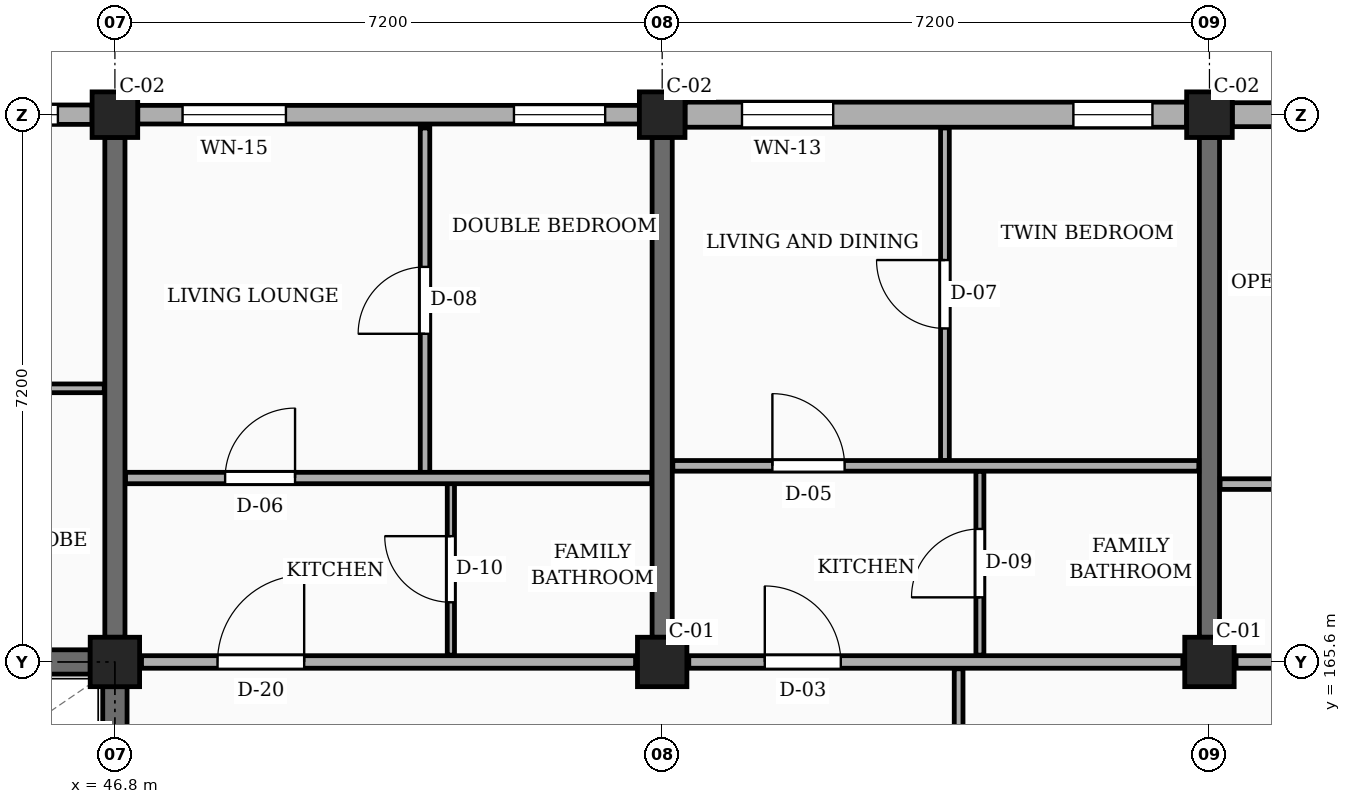
"""IFC4 building model, lengths in metres.
Left out: names, types, materials, properties, quantities, classifications, styles, units other than length and angle.
Written with IfcOpenShell. Run it as: python <this file> out.ifc"""

import sys

from ifc_helpers import new_model, si_unit, direction, frame, frame_2d, origin, origin_2d, place, context, subcontext, project, spatial, rectangle, extrude, element, fill, save


model = new_model("IFC4")
c1 = context("Model", 3, precision=1e-05, world=origin(), true_north=direction((0.0, 1.0)))
c2 = subcontext(c1, "Body", "Model", "MODEL_VIEW")
j1 = project(units=[si_unit("LENGTHUNIT", "METRE"), si_unit("PLANEANGLEUNIT", "RADIAN")], contexts=[c1])
p1 = place(None, origin())
s1 = spatial("IfcSite", under=j1, at=p1, CompositionType="ELEMENT")
p2 = place(p1, origin())
s2 = spatial("IfcBuilding", under=s1, at=p2, CompositionType="ELEMENT")
p3 = place(p2, frame((0.0, 0.0, 4.5)))
s3 = spatial("IfcBuildingStorey", under=s2, at=p3, CompositionType="ELEMENT", Elevation=4.5)
p4 = place(p3, frame((46.8, 165.6, 0.0), z_axis=(0.0, 0.0, 1.0), x_axis=(1.0, 0.0, 0.0)))
e1 = element("IfcColumn", 1, at=p4, inside=s3, PredefinedType="COLUMN", context=c2, shape_type="SweptSolid", body=[
    extrude(rectangle(XDim=0.65, YDim=0.65, at=origin_2d()), origin(), (0.0, 0.0, 1.0), 3.15),
])
p5 = place(p3, frame((46.8, 172.8, 0.0), z_axis=(0.0, 0.0, 1.0), x_axis=(1.0, 0.0, 0.0)))
e2 = element("IfcColumn", 2, at=p5, inside=s3, PredefinedType="COLUMN", context=c2, shape_type="SweptSolid", body=[
    extrude(rectangle(XDim=0.6, YDim=0.6, at=origin_2d()), origin(), (0.0, 0.0, 1.0), 3.15),
])
p6 = place(p3, frame((54.0, 165.6, 0.0), z_axis=(0.0, 0.0, 1.0), x_axis=(1.0, 0.0, 0.0)))
e3 = element("IfcColumn", 3, at=p6, inside=s3, PredefinedType="COLUMN", context=c2, shape_type="SweptSolid", body=[
    extrude(rectangle(XDim=0.65, YDim=0.65, at=origin_2d()), origin(), (0.0, 0.0, 1.0), 3.15),
])
p7 = place(p3, frame((54.0, 172.8, 0.0), z_axis=(0.0, 0.0, 1.0), x_axis=(1.0, 0.0, 0.0)))
e4 = element("IfcColumn", 4, at=p7, inside=s3, PredefinedType="COLUMN", context=c2, shape_type="SweptSolid", body=[
    extrude(rectangle(XDim=0.6, YDim=0.6, at=origin_2d()), origin(), (0.0, 0.0, 1.0), 3.15),
])
p8 = place(p3, frame((61.2, 165.6, 0.0), z_axis=(0.0, 0.0, 1.0), x_axis=(1.0, 0.0, 0.0)))
e5 = element("IfcColumn", 5, at=p8, inside=s3, PredefinedType="COLUMN", context=c2, shape_type="SweptSolid", body=[
    extrude(rectangle(XDim=0.65, YDim=0.65, at=origin_2d()), origin(), (0.0, 0.0, 1.0), 3.15),
])
p9 = place(p3, frame((61.2, 172.8, 0.0), z_axis=(0.0, 0.0, 1.0), x_axis=(1.0, 0.0, 0.0)))
e6 = element("IfcColumn", 6, at=p9, inside=s3, PredefinedType="COLUMN", context=c2, shape_type="SweptSolid", body=[
    extrude(rectangle(XDim=0.6, YDim=0.6, at=origin_2d()), origin(), (0.0, 0.0, 1.0), 3.15),
])
for number, where, z_axis, x_axis in (
    (7, (46.8, 165.925, 0.0), (0.0, 0.0, 1.0), (0.0, 1.0, 0.0)),
    (8, (54.0, 165.925, 0.0), (0.0, 0.0, 1.0), (0.0, 1.0, 0.0)),
    (9, (61.2, 165.925, 0.0), (0.0, 0.0, 1.0), (0.0, 1.0, 0.0)),
):
    element("IfcWall", number, at=place(p3, frame(where, z_axis=z_axis, x_axis=x_axis)), inside=s3, PredefinedType="SOLIDWALL", context=c2, shape_type="SweptSolid", body=[
        extrude(rectangle(XDim=6.575, YDim=0.265, at=frame_2d((3.288, 0.0))), origin(), (0.0, 0.0, 1.0), 2.185),
    ])
p10 = place(p3, frame((68.1, 172.8, 0.0), z_axis=(0.0, 0.0, 1.0), x_axis=(-1.0, 0.0, 0.0)))
e10 = element("IfcWall", 10, at=p10, inside=s3, PredefinedType="SOLIDWALL", context=c2, shape_type="SweptSolid", body=[
    extrude(rectangle(XDim=6.6, YDim=0.315, at=frame_2d((3.3, 0.0))), origin(), (0.0, 0.0, 1.0), 2.455),
])
p11 = place(p10, frame((0.45, 0.0, 0.78)))
e11 = element("IfcOpeningElement", 11, at=p11, cuts=e10, PredefinedType="OPENING", context=c2, shape_type="SweptSolid", body=[
    extrude(rectangle(XDim=0.88, YDim=1.26, at=frame_2d((0.44, 0.63))), frame((0.0, 0.167, 0.0), z_axis=(0.0, -1.0, 0.0), x_axis=(1.0, 0.0, 0.0)), (0.0, 0.0, 1.0), 0.335),
])
p12 = place(p10, frame((4.65, 0.0, 0.78)))
e12 = element("IfcOpeningElement", 12, at=p12, cuts=e10, PredefinedType="OPENING", context=c2, shape_type="SweptSolid", body=[
    extrude(rectangle(XDim=1.04, YDim=1.26, at=frame_2d((0.52, 0.63))), frame((0.0, 0.167, 0.0), z_axis=(0.0, -1.0, 0.0), x_axis=(1.0, 0.0, 0.0)), (0.0, 0.0, 1.0), 0.335),
])
p13 = place(p3, frame((60.9, 172.8, 0.0), z_axis=(0.0, 0.0, 1.0), x_axis=(-1.0, 0.0, 0.0)))
e13 = element("IfcWall", 13, at=p13, inside=s3, PredefinedType="SOLIDWALL", context=c2, shape_type="SweptSolid", body=[
    extrude(rectangle(XDim=6.6, YDim=0.33, at=frame_2d((3.3, 0.0))), origin(), (0.0, 0.0, 1.0), 2.455),
])
p14 = place(p13, frame((0.45, 0.0, 0.78)))
e14 = element("IfcOpeningElement", 14, at=p14, cuts=e13, PredefinedType="OPENING", context=c2, shape_type="SweptSolid", body=[
    extrude(rectangle(XDim=1.04, YDim=1.26, at=frame_2d((0.52, 0.63))), frame((0.0, 0.175, 0.0), z_axis=(0.0, -1.0, 0.0), x_axis=(1.0, 0.0, 0.0)), (0.0, 0.0, 1.0), 0.35),
])
p15 = place(p13, frame((4.65, 0.0, 0.78)))
e15 = element("IfcOpeningElement", 15, at=p15, cuts=e13, PredefinedType="OPENING", context=c2, shape_type="SweptSolid", body=[
    extrude(rectangle(XDim=1.2, YDim=1.26, at=frame_2d((0.6, 0.63))), frame((0.0, 0.175, 0.0), z_axis=(0.0, -1.0, 0.0), x_axis=(1.0, 0.0, 0.0)), (0.0, 0.0, 1.0), 0.35),
])
p16 = place(p3, frame((53.7, 172.8, 0.0), z_axis=(0.0, 0.0, 1.0), x_axis=(-1.0, 0.0, 0.0)))
e16 = element("IfcWall", 16, at=p16, inside=s3, PredefinedType="SOLIDWALL", context=c2, shape_type="SweptSolid", body=[
    extrude(rectangle(XDim=6.6, YDim=0.245, at=frame_2d((3.3, 0.0))), origin(), (0.0, 0.0, 1.0), 2.455),
])
p17 = place(p16, frame((0.45, 0.0, 0.78)))
e17 = element("IfcOpeningElement", 17, at=p17, cuts=e16, PredefinedType="OPENING", context=c2, shape_type="SweptSolid", body=[
    extrude(rectangle(XDim=1.2, YDim=1.26, at=frame_2d((0.6, 0.63))), frame((0.0, 0.133, 0.0), z_axis=(0.0, -1.0, 0.0), x_axis=(1.0, 0.0, 0.0)), (0.0, 0.0, 1.0), 0.265),
])
p18 = place(p16, frame((4.65, 0.0, 0.78)))
e18 = element("IfcOpeningElement", 18, at=p18, cuts=e16, PredefinedType="OPENING", context=c2, shape_type="SweptSolid", body=[
    extrude(rectangle(XDim=1.36, YDim=1.26, at=frame_2d((0.68, 0.63))), frame((0.0, 0.133, 0.0), z_axis=(0.0, -1.0, 0.0), x_axis=(1.0, 0.0, 0.0)), (0.0, 0.0, 1.0), 0.265),
])
p19 = place(p3, frame((46.5, 172.8, 0.0), z_axis=(0.0, 0.0, 1.0), x_axis=(-1.0, 0.0, 0.0)))
e19 = element("IfcWall", 19, at=p19, inside=s3, PredefinedType="SOLIDWALL", context=c2, shape_type="SweptSolid", body=[
    extrude(rectangle(XDim=6.6, YDim=0.255, at=frame_2d((3.3, 0.0))), origin(), (0.0, 0.0, 1.0), 2.455),
])
p20 = place(p19, frame((0.45, 0.0, 0.78)))
e20 = element("IfcOpeningElement", 20, at=p20, cuts=e19, PredefinedType="OPENING", context=c2, shape_type="SweptSolid", body=[
    extrude(rectangle(XDim=1.36, YDim=1.26, at=frame_2d((0.68, 0.63))), frame((0.0, 0.137, 0.0), z_axis=(0.0, -1.0, 0.0), x_axis=(1.0, 0.0, 0.0)), (0.0, 0.0, 1.0), 0.275),
])
p21 = place(p19, frame((4.65, 0.0, 0.78)))
e21 = element("IfcOpeningElement", 21, at=p21, cuts=e19, PredefinedType="OPENING", context=c2, shape_type="SweptSolid", body=[
    extrude(rectangle(XDim=0.9, YDim=1.36, at=frame_2d((0.45, 0.68))), frame((0.0, 0.137, 0.0), z_axis=(0.0, -1.0, 0.0), x_axis=(1.0, 0.0, 0.0)), (0.0, 0.0, 1.0), 0.275),
])
p22 = place(p3, frame((39.925, 165.6, 0.0), z_axis=(0.0, 0.0, 1.0), x_axis=(1.0, 0.0, 0.0)))
e22 = element("IfcWall", 22, at=p22, inside=s3, PredefinedType="SHEAR", context=c2, shape_type="SweptSolid", body=[
    extrude(rectangle(XDim=6.55, YDim=0.32, at=frame_2d((3.275, 0.0))), origin(), (0.0, 0.0, 1.0), 2.885),
])
p23 = place(p3, frame((46.8, 158.725, 0.0), z_axis=(0.0, 0.0, 1.0), x_axis=(0.0, 1.0, 0.0)))
e23 = element("IfcWall", 23, at=p23, inside=s3, PredefinedType="SHEAR", context=c2, shape_type="SweptSolid", body=[
    extrude(rectangle(XDim=6.55, YDim=0.32, at=frame_2d((3.275, 0.0))), origin(), (0.0, 0.0, 1.0), 2.885),
])
p24 = place(p3, frame((47.15, 165.6, 0.0), z_axis=(0.0, 0.0, 1.0), x_axis=(1.0, 0.0, 0.0)))
e24 = element("IfcWall", 24, at=p24, inside=s3, PredefinedType="PARTITIONING", context=c2, shape_type="SweptSolid", body=[
    extrude(rectangle(XDim=6.5, YDim=0.165, at=frame_2d((3.25, 0.0))), origin(), (0.0, 0.0, 1.0), 2.185),
])
p25 = place(p24, frame((1.0, 0.0, 0.0)))
e25 = element("IfcOpeningElement", 25, at=p25, cuts=e24, PredefinedType="OPENING", context=c2, shape_type="SweptSolid", body=[
    extrude(rectangle(XDim=1.14, YDim=2.18, at=frame_2d((0.57, 1.09))), frame((0.0, 0.093, 0.0), z_axis=(0.0, -1.0, 0.0), x_axis=(1.0, 0.0, 0.0)), (0.0, 0.0, 1.0), 0.185),
])
p26 = place(p3, frame((54.35, 165.6, 0.0), z_axis=(0.0, 0.0, 1.0), x_axis=(1.0, 0.0, 0.0)))
e26 = element("IfcWall", 26, at=p26, inside=s3, PredefinedType="PARTITIONING", context=c2, shape_type="SweptSolid", body=[
    extrude(rectangle(XDim=6.5, YDim=0.165, at=frame_2d((3.25, 0.0))), origin(), (0.0, 0.0, 1.0), 2.185),
])
p27 = place(p26, frame((1.0, 0.0, 0.0)))
e27 = element("IfcOpeningElement", 27, at=p27, cuts=e26, PredefinedType="OPENING", context=c2, shape_type="SweptSolid", body=[
    extrude(rectangle(XDim=1.0, YDim=2.15, at=frame_2d((0.5, 1.075))), frame((0.0, 0.093, 0.0), z_axis=(0.0, -1.0, 0.0), x_axis=(1.0, 0.0, 0.0)), (0.0, 0.0, 1.0), 0.185),
])
p28 = place(p3, frame((61.55, 165.6, 0.0), z_axis=(0.0, 0.0, 1.0), x_axis=(1.0, 0.0, 0.0)))
e28 = element("IfcWall", 28, at=p28, inside=s3, PredefinedType="PARTITIONING", context=c2, shape_type="SweptSolid", body=[
    extrude(rectangle(XDim=6.5, YDim=0.165, at=frame_2d((3.25, 0.0))), origin(), (0.0, 0.0, 1.0), 2.185),
])
p29 = place(p28, frame((1.0, 0.0, 0.0)))
e29 = element("IfcOpeningElement", 29, at=p29, cuts=e28, PredefinedType="OPENING", context=c2, shape_type="SweptSolid", body=[
    extrude(rectangle(XDim=0.94, YDim=2.12, at=frame_2d((0.47, 1.06))), frame((0.0, 0.093, 0.0), z_axis=(0.0, -1.0, 0.0), x_axis=(1.0, 0.0, 0.0)), (0.0, 0.0, 1.0), 0.185),
])
p30 = place(p3, frame((39.74, 169.2, 0.0), z_axis=(0.0, 0.0, 1.0), x_axis=(1.0, 0.0, 0.0)))
e30 = element("IfcWall", 30, at=p30, inside=s3, PredefinedType="PARTITIONING", context=c2, shape_type="SweptSolid", body=[
    extrude(rectangle(XDim=6.92, YDim=0.115, at=frame_2d((3.46, 0.0))), origin(), (0.0, 0.0, 1.0), 2.32),
])
p31 = place(p30, frame((1.05, 0.0, 0.0)))
e31 = element("IfcOpeningElement", 31, at=p31, cuts=e30, PredefinedType="OPENING", context=c2, shape_type="SweptSolid", body=[
    extrude(rectangle(XDim=0.87, YDim=2.05, at=frame_2d((0.435, 1.025))), frame((0.0, 0.067, 0.0), z_axis=(0.0, -1.0, 0.0), x_axis=(1.0, 0.0, 0.0)), (0.0, 0.0, 1.0), 0.135),
])
p32 = place(p30, frame((4.45, 0.0, 0.0)))
e32 = element("IfcOpeningElement", 32, at=p32, cuts=e30, PredefinedType="OPENING", context=c2, shape_type="SweptSolid", body=[
    extrude(rectangle(XDim=0.88, YDim=2.08, at=frame_2d((0.44, 1.04))), frame((0.0, 0.067, 0.0), z_axis=(0.0, -1.0, 0.0), x_axis=(1.0, 0.0, 0.0)), (0.0, 0.0, 1.0), 0.135),
])
p33 = place(p3, frame((50.88, 168.09, 0.0), z_axis=(0.0, 0.0, 1.0), x_axis=(0.0, 1.0, 0.0)))
e33 = element("IfcWall", 33, at=p33, inside=s3, PredefinedType="PARTITIONING", context=c2, shape_type="SweptSolid", body=[
    extrude(rectangle(XDim=4.535, YDim=0.125, at=frame_2d((2.268, 0.0))), origin(), (0.0, 0.0, 1.0), 2.32),
])
p34 = place(p33, frame((1.827, 0.0, 0.0)))
e34 = element("IfcOpeningElement", 34, at=p34, cuts=e33, PredefinedType="OPENING", context=c2, shape_type="SweptSolid", body=[
    extrude(rectangle(XDim=0.88, YDim=2.08, at=frame_2d((0.44, 1.04))), frame((0.0, 0.073, 0.0), z_axis=(0.0, -1.0, 0.0), x_axis=(1.0, 0.0, 0.0)), (0.0, 0.0, 1.0), 0.145),
])
p35 = place(p3, frame((51.22, 165.69, 0.0), z_axis=(0.0, 0.0, 1.0), x_axis=(0.0, 1.0, 0.0)))
e35 = element("IfcWall", 35, at=p35, inside=s3, PredefinedType="PARTITIONING", context=c2, shape_type="SweptSolid", body=[
    extrude(rectangle(XDim=2.26, YDim=0.095, at=frame_2d((1.13, 0.0))), origin(), (0.0, 0.0, 1.0), 2.32),
])
p36 = place(p35, frame((0.695, 0.0, 0.0)))
e36 = element("IfcOpeningElement", 36, at=p36, cuts=e35, PredefinedType="OPENING", context=c2, shape_type="SweptSolid", body=[
    extrude(rectangle(XDim=0.87, YDim=2.05, at=frame_2d((0.435, 1.025))), frame((0.0, 0.058, 0.0), z_axis=(0.0, -1.0, 0.0), x_axis=(1.0, 0.0, 0.0)), (0.0, 0.0, 1.0), 0.115),
])
p37 = place(p3, frame((46.94, 168.02, 0.0), z_axis=(0.0, 0.0, 1.0), x_axis=(1.0, 0.0, 0.0)))
e37 = element("IfcWall", 37, at=p37, inside=s3, PredefinedType="PARTITIONING", context=c2, shape_type="SweptSolid", body=[
    extrude(rectangle(XDim=6.92, YDim=0.15, at=frame_2d((3.46, 0.0))), origin(), (0.0, 0.0, 1.0), 2.32),
])
p38 = place(p37, frame((1.31, 0.0, 0.0)))
e38 = element("IfcOpeningElement", 38, at=p38, cuts=e37, PredefinedType="OPENING", context=c2, shape_type="SweptSolid", body=[
    extrude(rectangle(XDim=0.92, YDim=2.1, at=frame_2d((0.46, 1.05))), frame((0.0, 0.085, 0.0), z_axis=(0.0, -1.0, 0.0), x_axis=(1.0, 0.0, 0.0)), (0.0, 0.0, 1.0), 0.17),
])
p39 = place(p3, frame((57.9, 158.49, 0.0), z_axis=(0.0, 0.0, 1.0), x_axis=(0.0, 1.0, 0.0)))
e39 = element("IfcWall", 39, at=p39, inside=s3, PredefinedType="PARTITIONING", context=c2, shape_type="SweptSolid", body=[
    extrude(rectangle(XDim=7.02, YDim=0.115, at=frame_2d((3.51, 0.0))), origin(), (0.0, 0.0, 1.0), 2.32),
])
p40 = place(p39, frame((2.85, 0.0, 0.0)))
e40 = element("IfcOpeningElement", 40, at=p40, cuts=e39, PredefinedType="OPENING", context=c2, shape_type="SweptSolid", body=[
    extrude(rectangle(XDim=1.02, YDim=2.15, at=frame_2d((0.51, 1.075))), frame((0.0, 0.067, 0.0), z_axis=(0.0, -1.0, 0.0), x_axis=(1.0, 0.0, 0.0)), (0.0, 0.0, 1.0), 0.135),
])
p41 = place(p3, frame((57.72, 168.25, 0.0), z_axis=(0.0, 0.0, 1.0), x_axis=(0.0, 1.0, 0.0)))
e41 = element("IfcWall", 41, at=p41, inside=s3, PredefinedType="PARTITIONING", context=c2, shape_type="SweptSolid", body=[
    extrude(rectangle(XDim=4.375, YDim=0.115, at=frame_2d((2.188, 0.0))), origin(), (0.0, 0.0, 1.0), 2.32),
])
p42 = place(p41, frame((1.738, 0.0, 0.0)))
e42 = element("IfcOpeningElement", 42, at=p42, cuts=e41, PredefinedType="OPENING", context=c2, shape_type="SweptSolid", body=[
    extrude(rectangle(XDim=0.9, YDim=2.1, at=frame_2d((0.45, 1.05))), frame((0.0, 0.067, 0.0), z_axis=(0.0, -1.0, 0.0), x_axis=(1.0, 0.0, 0.0)), (0.0, 0.0, 1.0), 0.135),
])
p43 = place(p3, frame((58.18, 165.69, 0.0), z_axis=(0.0, 0.0, 1.0), x_axis=(0.0, 1.0, 0.0)))
e43 = element("IfcWall", 43, at=p43, inside=s3, PredefinedType="PARTITIONING", context=c2, shape_type="SweptSolid", body=[
    extrude(rectangle(XDim=2.42, YDim=0.105, at=frame_2d((1.21, 0.0))), origin(), (0.0, 0.0, 1.0), 2.32),
])
p44 = place(p43, frame((0.76, 0.0, 0.0)))
e44 = element("IfcOpeningElement", 44, at=p44, cuts=e43, PredefinedType="OPENING", context=c2, shape_type="SweptSolid", body=[
    extrude(rectangle(XDim=0.9, YDim=2.05, at=frame_2d((0.45, 1.025))), frame((0.0, 0.062, 0.0), z_axis=(0.0, -1.0, 0.0), x_axis=(1.0, 0.0, 0.0)), (0.0, 0.0, 1.0), 0.125),
])
p45 = place(p3, frame((54.14, 168.18, 0.0), z_axis=(0.0, 0.0, 1.0), x_axis=(1.0, 0.0, 0.0)))
e45 = element("IfcWall", 45, at=p45, inside=s3, PredefinedType="PARTITIONING", context=c2, shape_type="SweptSolid", body=[
    extrude(rectangle(XDim=6.92, YDim=0.14, at=frame_2d((3.46, 0.0))), origin(), (0.0, 0.0, 1.0), 2.32),
])
p46 = place(p45, frame((1.31, 0.0, 0.0)))
e46 = element("IfcOpeningElement", 46, at=p46, cuts=e45, PredefinedType="OPENING", context=c2, shape_type="SweptSolid", body=[
    extrude(rectangle(XDim=0.95, YDim=2.1, at=frame_2d((0.475, 1.05))), frame((0.0, 0.08, 0.0), z_axis=(0.0, -1.0, 0.0), x_axis=(1.0, 0.0, 0.0)), (0.0, 0.0, 1.0), 0.16),
])
p47 = place(p3, frame((61.34, 167.94, 0.0), z_axis=(0.0, 0.0, 1.0), x_axis=(1.0, 0.0, 0.0)))
e47 = element("IfcWall", 47, at=p47, inside=s3, PredefinedType="PARTITIONING", context=c2, shape_type="SweptSolid", body=[
    extrude(rectangle(XDim=6.92, YDim=0.14, at=frame_2d((3.46, 0.0))), origin(), (0.0, 0.0, 1.0), 2.32),
])
p48 = place(p47, frame((1.31, 0.0, 0.0)))
e48 = element("IfcOpeningElement", 48, at=p48, cuts=e47, PredefinedType="OPENING", context=c2, shape_type="SweptSolid", body=[
    extrude(rectangle(XDim=0.92, YDim=2.1, at=frame_2d((0.46, 1.05))), frame((0.0, 0.08, 0.0), z_axis=(0.0, -1.0, 0.0), x_axis=(1.0, 0.0, 0.0)), (0.0, 0.0, 1.0), 0.16),
])
p49 = place(p14, origin())
e49 = element("IfcWindow", 49, at=p49, inside=s3, PartitioningType="SINGLE_PANEL", PredefinedType="WINDOW", context=c2, shape_type="SweptSolid", body=[
    extrude(rectangle(XDim=1.04, YDim=1.26, at=frame_2d((0.52, 0.63))), frame((0.0, 0.03, 0.0), z_axis=(0.0, -1.0, 0.0), x_axis=(1.0, 0.0, 0.0)), (0.0, 0.0, 1.0), 0.06),
])
fill(e14, e49)
p50 = place(p15, origin())
e50 = element("IfcWindow", 50, at=p50, inside=s3, PartitioningType="SINGLE_PANEL", PredefinedType="WINDOW", context=c2, shape_type="SweptSolid", body=[
    extrude(rectangle(XDim=1.2, YDim=1.26, at=frame_2d((0.6, 0.63))), frame((0.0, 0.03, 0.0), z_axis=(0.0, -1.0, 0.0), x_axis=(1.0, 0.0, 0.0)), (0.0, 0.0, 1.0), 0.06),
])
fill(e15, e50)
p51 = place(p17, origin())
e51 = element("IfcWindow", 51, at=p51, inside=s3, PartitioningType="SINGLE_PANEL", PredefinedType="WINDOW", context=c2, shape_type="SweptSolid", body=[
    extrude(rectangle(XDim=1.2, YDim=1.26, at=frame_2d((0.6, 0.63))), frame((0.0, 0.03, 0.0), z_axis=(0.0, -1.0, 0.0), x_axis=(1.0, 0.0, 0.0)), (0.0, 0.0, 1.0), 0.06),
])
fill(e17, e51)
p52 = place(p18, origin())
e52 = element("IfcWindow", 52, at=p52, inside=s3, PartitioningType="SINGLE_PANEL", PredefinedType="WINDOW", context=c2, shape_type="SweptSolid", body=[
    extrude(rectangle(XDim=1.36, YDim=1.26, at=frame_2d((0.68, 0.63))), frame((0.0, 0.03, 0.0), z_axis=(0.0, -1.0, 0.0), x_axis=(1.0, 0.0, 0.0)), (0.0, 0.0, 1.0), 0.06),
])
fill(e18, e52)
p53 = place(p20, origin())
e53 = element("IfcWindow", 53, at=p53, inside=s3, PartitioningType="SINGLE_PANEL", PredefinedType="WINDOW", context=c2, shape_type="SweptSolid", body=[
    extrude(rectangle(XDim=1.36, YDim=1.26, at=frame_2d((0.68, 0.63))), frame((0.0, 0.03, 0.0), z_axis=(0.0, -1.0, 0.0), x_axis=(1.0, 0.0, 0.0)), (0.0, 0.0, 1.0), 0.06),
])
fill(e20, e53)
p54 = place(p25, origin())
e54 = element("IfcDoor", 54, at=p54, inside=s3, OperationType="SINGLE_SWING_RIGHT", PredefinedType="DOOR", context=c2, shape_type="SweptSolid", body=[
    extrude(rectangle(XDim=1.14, YDim=2.18, at=frame_2d((0.57, 1.09))), frame((0.0, 0.025, 0.0), z_axis=(0.0, -1.0, 0.0), x_axis=(1.0, 0.0, 0.0)), (0.0, 0.0, 1.0), 0.05),
])
fill(e25, e54)
p55 = place(p27, origin())
e55 = element("IfcDoor", 55, at=p55, inside=s3, OperationType="SINGLE_SWING_LEFT", PredefinedType="DOOR", context=c2, shape_type="SweptSolid", body=[
    extrude(rectangle(XDim=1.0, YDim=2.15, at=frame_2d((0.5, 1.075))), frame((0.0, 0.025, 0.0), z_axis=(0.0, -1.0, 0.0), x_axis=(1.0, 0.0, 0.0)), (0.0, 0.0, 1.0), 0.05),
])
fill(e27, e55)
p56 = place(p34, origin())
e56 = element("IfcDoor", 56, at=p56, inside=s3, OperationType="SINGLE_SWING_LEFT", PredefinedType="DOOR", context=c2, shape_type="SweptSolid", body=[
    extrude(rectangle(XDim=0.88, YDim=2.08, at=frame_2d((0.44, 1.04))), frame((0.0, 0.025, 0.0), z_axis=(0.0, -1.0, 0.0), x_axis=(1.0, 0.0, 0.0)), (0.0, 0.0, 1.0), 0.05),
])
fill(e34, e56)
p57 = place(p36, origin())
e57 = element("IfcDoor", 57, at=p57, inside=s3, OperationType="SINGLE_SWING_RIGHT", PredefinedType="DOOR", context=c2, shape_type="SweptSolid", body=[
    extrude(rectangle(XDim=0.87, YDim=2.05, at=frame_2d((0.435, 1.025))), frame((0.0, 0.025, 0.0), z_axis=(0.0, -1.0, 0.0), x_axis=(1.0, 0.0, 0.0)), (0.0, 0.0, 1.0), 0.05),
])
fill(e36, e57)
p58 = place(p38, origin())
e58 = element("IfcDoor", 58, at=p58, inside=s3, OperationType="SINGLE_SWING_RIGHT", PredefinedType="DOOR", context=c2, shape_type="SweptSolid", body=[
    extrude(rectangle(XDim=0.92, YDim=2.1, at=frame_2d((0.46, 1.05))), frame((0.0, 0.025, 0.0), z_axis=(0.0, -1.0, 0.0), x_axis=(1.0, 0.0, 0.0)), (0.0, 0.0, 1.0), 0.05),
])
fill(e38, e58)
p59 = place(p42, origin())
e59 = element("IfcDoor", 59, at=p59, inside=s3, OperationType="SINGLE_SWING_RIGHT", PredefinedType="DOOR", context=c2, shape_type="SweptSolid", body=[
    extrude(rectangle(XDim=0.9, YDim=2.1, at=frame_2d((0.45, 1.05))), frame((0.0, 0.025, 0.0), z_axis=(0.0, -1.0, 0.0), x_axis=(1.0, 0.0, 0.0)), (0.0, 0.0, 1.0), 0.05),
])
fill(e42, e59)
p60 = place(p44, origin())
e60 = element("IfcDoor", 60, at=p60, inside=s3, OperationType="SINGLE_SWING_LEFT", PredefinedType="DOOR", context=c2, shape_type="SweptSolid", body=[
    extrude(rectangle(XDim=0.9, YDim=2.05, at=frame_2d((0.45, 1.025))), frame((0.0, 0.025, 0.0), z_axis=(0.0, -1.0, 0.0), x_axis=(1.0, 0.0, 0.0)), (0.0, 0.0, 1.0), 0.05),
])
fill(e44, e60)
p61 = place(p46, origin())
e61 = element("IfcDoor", 61, at=p61, inside=s3, OperationType="SINGLE_SWING_LEFT", PredefinedType="DOOR", context=c2, shape_type="SweptSolid", body=[
    extrude(rectangle(XDim=0.95, YDim=2.1, at=frame_2d((0.475, 1.05))), frame((0.0, 0.025, 0.0), z_axis=(0.0, -1.0, 0.0), x_axis=(1.0, 0.0, 0.0)), (0.0, 0.0, 1.0), 0.05),
])
fill(e46, e61)
save(model, sys.argv[1])
